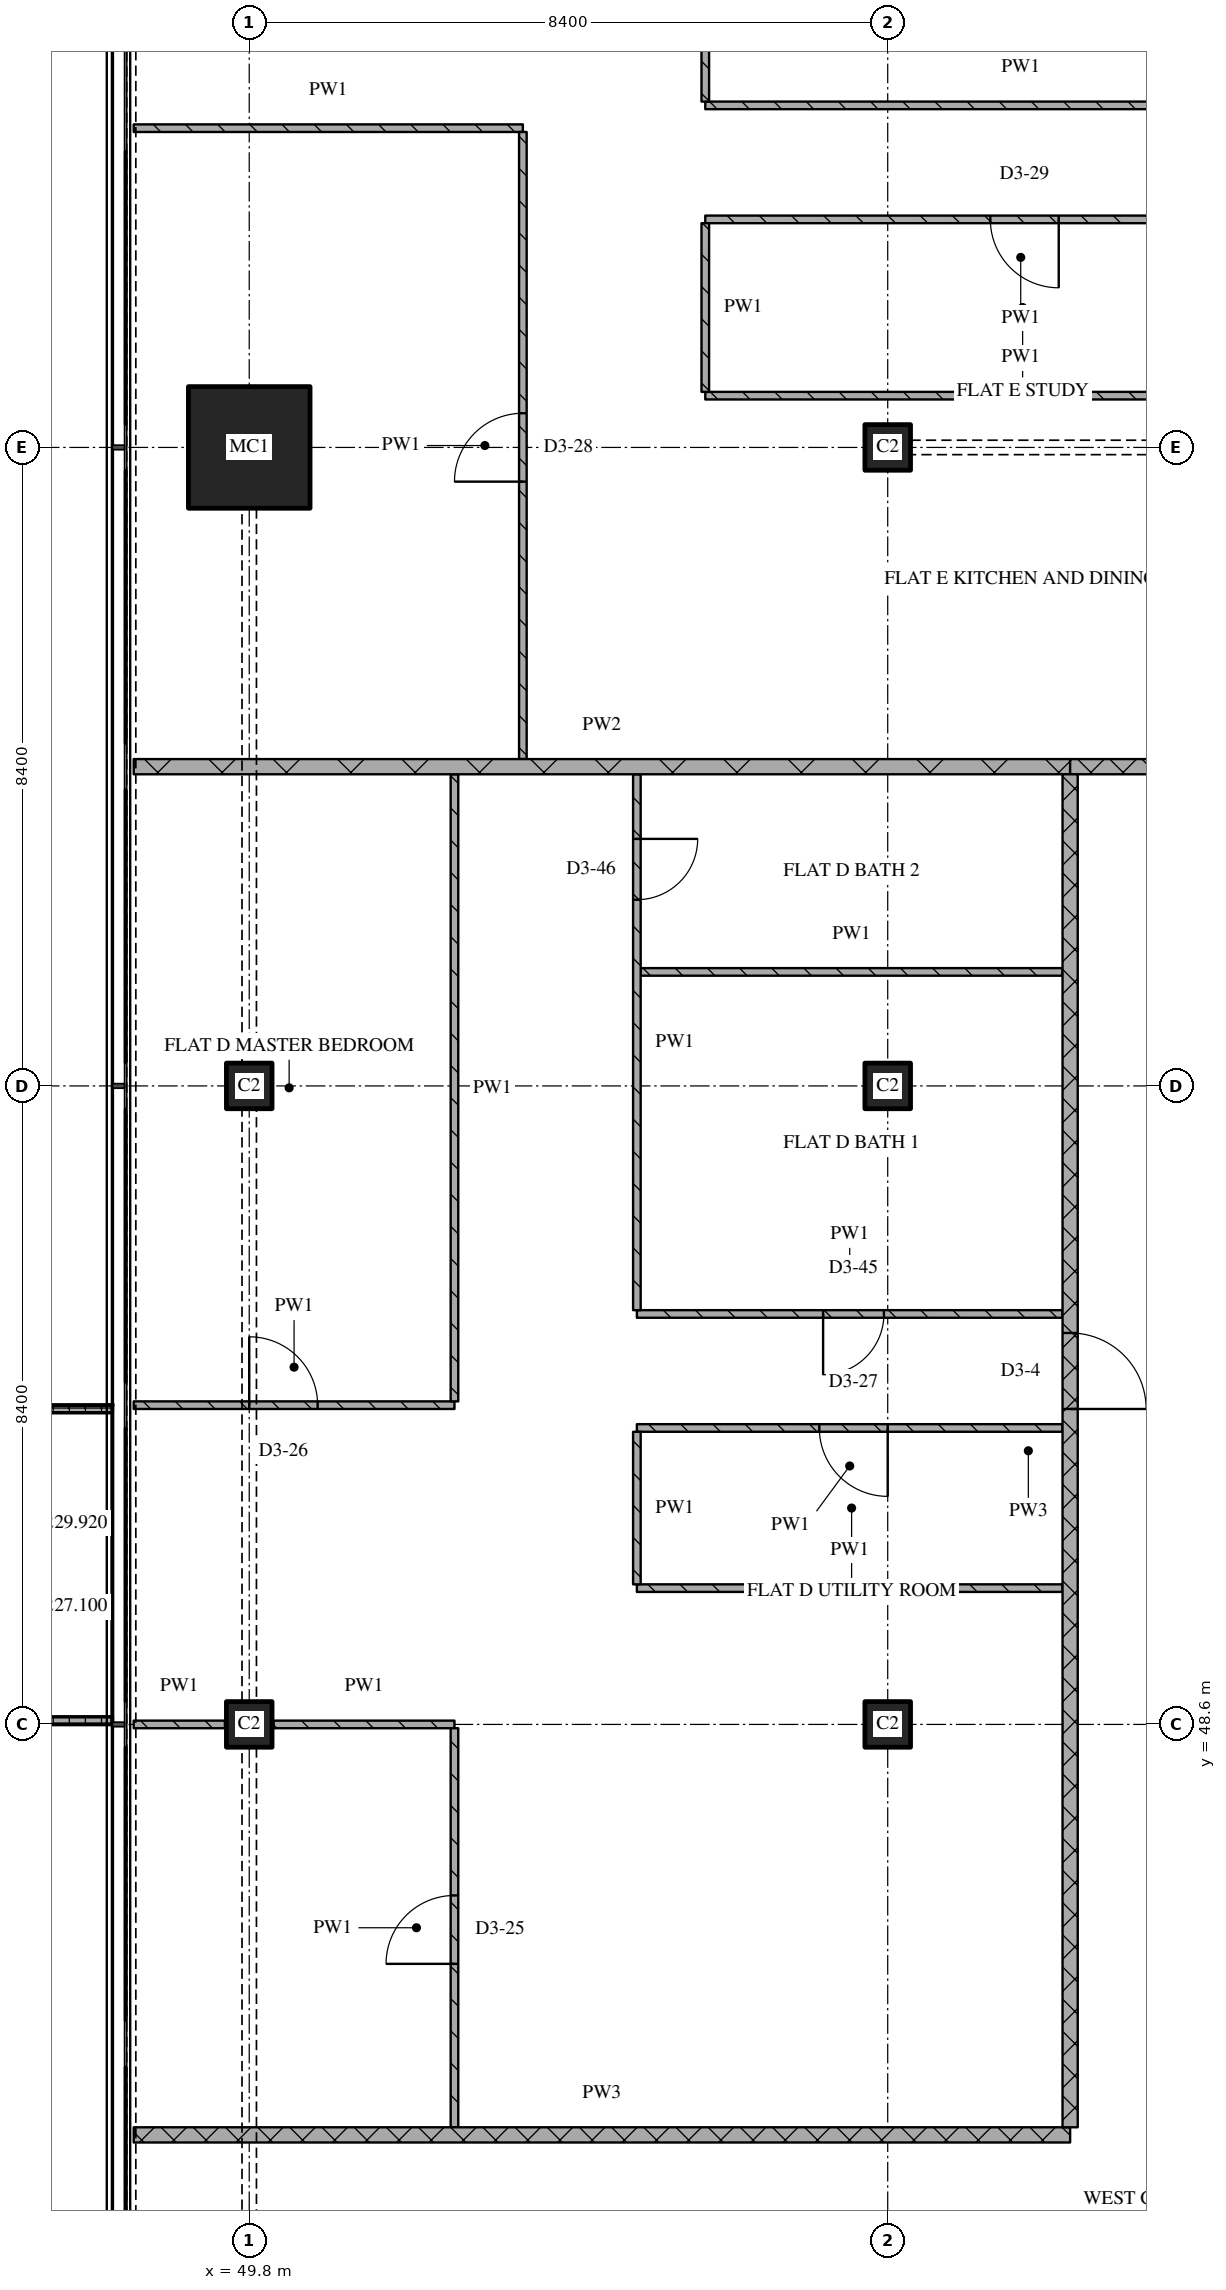
"""IFC4 building model, lengths in metres.
Left out: names, types, materials, properties, quantities, classifications, styles, units other than length and angle.
Written with IfcOpenShell. Run it as: python <this file> out.ifc"""

import sys

from ifc_helpers import new_model, si_unit, direction, frame, frame_2d, origin, origin_2d, place, context, subcontext, project, spatial, polyline, rectangle, outline, extrude, element, fill, save


model = new_model("IFC4")
c1 = context("Model", 3, precision=1e-05, world=origin(), true_north=direction((0.0, 1.0)))
c2 = subcontext(c1, "Body", "Model", "MODEL_VIEW")
j1 = project(units=[si_unit("LENGTHUNIT", "METRE"), si_unit("PLANEANGLEUNIT", "RADIAN")], contexts=[c1])
p1 = place(None, origin())
s1 = spatial("IfcSite", under=j1, at=p1, CompositionType="ELEMENT")
p2 = place(p1, origin())
s2 = spatial("IfcBuilding", under=s1, at=p2, CompositionType="ELEMENT")
p3 = place(p2, frame((0.0, 0.0, 227.1)))
s3 = spatial("IfcBuildingStorey", under=s2, at=p3, CompositionType="ELEMENT", Elevation=227.1)
for number, where, z_axis, x_axis in (
    (1, (49.8, 48.6, 0.0), (0.0, 0.0, 1.0), (1.0, 0.0, 0.0)),
    (2, (49.8, 57.0, 0.0), (0.0, 0.0, 1.0), (1.0, 0.0, 0.0)),
):
    element("IfcColumn", number, at=place(p3, frame(where, z_axis=z_axis, x_axis=x_axis)), inside=s3, PredefinedType="COLUMN", context=c2, shape_type="SweptSolid", body=[
        extrude(rectangle(XDim=0.6, YDim=0.6, at=origin_2d()), origin(), (0.0, 0.0, 1.0), 3.6),
    ])
p4 = place(p3, frame((49.8, 65.4, 0.0), z_axis=(0.0, 0.0, 1.0), x_axis=(1.0, 0.0, 0.0)))
e3 = element("IfcColumn", 3, at=p4, inside=s3, PredefinedType="COLUMN", context=c2, shape_type="SweptSolid", body=[
    extrude(rectangle(XDim=1.6, YDim=1.6, at=origin_2d()), origin(), (0.0, 0.0, 1.0), 3.6),
])
for number, where, z_axis, x_axis in (
    (4, (58.2, 48.6, 0.0), (0.0, 0.0, 1.0), (1.0, 0.0, 0.0)),
    (5, (58.2, 57.0, 0.0), (0.0, 0.0, 1.0), (1.0, 0.0, 0.0)),
    (6, (58.2, 65.4, 0.0), (0.0, 0.0, 1.0), (1.0, 0.0, 0.0)),
):
    element("IfcColumn", number, at=place(p3, frame(where, z_axis=z_axis, x_axis=x_axis)), inside=s3, PredefinedType="COLUMN", context=c2, shape_type="SweptSolid", body=[
        extrude(rectangle(XDim=0.6, YDim=0.6, at=origin_2d()), origin(), (0.0, 0.0, 1.0), 3.6),
    ])
p5 = place(p3, origin())
e7 = element("IfcWall", 7, at=p5, inside=s3, PredefinedType="SOLIDWALL", context=c2, shape_type="SweptSolid", body=[
    extrude(outline(polyline([(48.0, 52.8), (48.0, 52.7), (46.367, 52.7), (46.367, 48.7), (48.0, 48.7), (48.0, 48.6), (46.267, 48.6), (46.267, 52.8), (48.0, 52.8)])), origin(), (0.0, 0.0, 1.0), 1.0),
])
p6 = place(p3, frame((48.28, 43.2, 0.0), z_axis=(0.0, 0.0, 1.0), x_axis=(1.0, 0.0, 0.0)))
e8 = element("IfcWall", 8, at=p6, inside=s3, PredefinedType="PARTITIONING", context=c2, shape_type="SweptSolid", body=[
    extrude(rectangle(XDim=12.32, YDim=0.2, at=frame_2d((6.16, 0.0))), origin(), (0.0, 0.0, 1.0), 3.32),
])
p7 = place(p3, frame((48.28, 48.6, 0.0), z_axis=(0.0, 0.0, 1.0), x_axis=(1.0, 0.0, 0.0)))
e9 = element("IfcWall", 9, at=p7, inside=s3, PredefinedType="PARTITIONING", context=c2, shape_type="SweptSolid", body=[
    extrude(rectangle(XDim=1.2, YDim=0.1, at=frame_2d((0.6, 0.0))), origin(), (0.0, 0.0, 1.0), 3.32),
])
p8 = place(p3, frame((50.12, 48.6, 0.0), z_axis=(0.0, 0.0, 1.0), x_axis=(1.0, 0.0, 0.0)))
e10 = element("IfcWall", 10, at=p8, inside=s3, PredefinedType="PARTITIONING", context=c2, shape_type="SweptSolid", body=[
    extrude(rectangle(XDim=2.38, YDim=0.1, at=frame_2d((1.19, 0.0))), origin(), (0.0, 0.0, 1.0), 3.32),
])
p9 = place(p3, frame((54.9, 50.393, 0.0), z_axis=(0.0, 0.0, 1.0), x_axis=(1.0, 0.0, 0.0)))
e11 = element("IfcWall", 11, at=p9, inside=s3, PredefinedType="PARTITIONING", context=c2, shape_type="SweptSolid", body=[
    extrude(rectangle(XDim=5.6, YDim=0.1, at=frame_2d((2.8, 0.0))), origin(), (0.0, 0.0, 1.0), 3.32),
])
p10 = place(p3, frame((60.5, 52.5, 0.0), z_axis=(0.0, 0.0, 1.0), x_axis=(-1.0, 0.0, 0.0)))
e12 = element("IfcWall", 12, at=p10, inside=s3, PredefinedType="PARTITIONING", context=c2, shape_type="SweptSolid", body=[
    extrude(rectangle(XDim=5.6, YDim=0.1, at=frame_2d((2.8, 0.0))), origin(), (0.0, 0.0, 1.0), 3.32),
])
p11 = place(p10, frame((2.3, 0.0, 0.0)))
e13 = element("IfcOpeningElement", 13, at=p11, cuts=e12, PredefinedType="OPENING", context=c2, shape_type="SweptSolid", body=[
    extrude(rectangle(XDim=0.9, YDim=2.1, at=frame_2d((0.45, 1.05))), frame((0.0, 0.06, 0.0), z_axis=(0.0, -1.0, 0.0), x_axis=(1.0, 0.0, 0.0)), (0.0, 0.0, 1.0), 0.12),
])
p12 = place(p3, frame((48.28, 52.8, 0.0), z_axis=(0.0, 0.0, 1.0), x_axis=(1.0, 0.0, 0.0)))
e14 = element("IfcWall", 14, at=p12, inside=s3, PredefinedType="PARTITIONING", context=c2, shape_type="SweptSolid", body=[
    extrude(rectangle(XDim=4.22, YDim=0.1, at=frame_2d((2.11, 0.0))), origin(), (0.0, 0.0, 1.0), 3.32),
])
p13 = place(p12, frame((1.52, 0.0, 0.0)))
e15 = element("IfcOpeningElement", 15, at=p13, cuts=e14, PredefinedType="OPENING", context=c2, shape_type="SweptSolid", body=[
    extrude(rectangle(XDim=0.9, YDim=2.1, at=frame_2d((0.45, 1.05))), frame((0.0, 0.06, 0.0), z_axis=(0.0, -1.0, 0.0), x_axis=(1.0, 0.0, 0.0)), (0.0, 0.0, 1.0), 0.12),
])
p14 = place(p3, frame((54.9, 54.0, 0.0), z_axis=(0.0, 0.0, 1.0), x_axis=(1.0, 0.0, 0.0)))
e16 = element("IfcWall", 16, at=p14, inside=s3, PredefinedType="PARTITIONING", context=c2, shape_type="SweptSolid", body=[
    extrude(rectangle(XDim=5.6, YDim=0.1, at=frame_2d((2.8, 0.0))), origin(), (0.0, 0.0, 1.0), 3.32),
])
p15 = place(p14, frame((2.45, 0.0, 0.0)))
e17 = element("IfcOpeningElement", 17, at=p15, cuts=e16, PredefinedType="OPENING", context=c2, shape_type="SweptSolid", body=[
    extrude(rectangle(XDim=0.8, YDim=2.1, at=frame_2d((0.4, 1.05))), frame((0.0, 0.06, 0.0), z_axis=(0.0, -1.0, 0.0), x_axis=(1.0, 0.0, 0.0)), (0.0, 0.0, 1.0), 0.12),
])
p16 = place(p3, frame((54.95, 58.5, 0.0), z_axis=(0.0, 0.0, 1.0), x_axis=(1.0, 0.0, 0.0)))
e18 = element("IfcWall", 18, at=p16, inside=s3, PredefinedType="PARTITIONING", context=c2, shape_type="SweptSolid", body=[
    extrude(rectangle(XDim=5.55, YDim=0.1, at=frame_2d((2.775, 0.0))), origin(), (0.0, 0.0, 1.0), 3.32),
])
p17 = place(p3, frame((60.6, 61.2, 0.0), z_axis=(0.0, 0.0, 1.0), x_axis=(1.0, 0.0, 0.0)))
e19 = element("IfcWall", 19, at=p17, inside=s3, PredefinedType="PARTITIONING", context=c2, shape_type="SweptSolid", body=[
    extrude(rectangle(XDim=3.6, YDim=0.2, at=frame_2d((1.8, 0.0))), origin(), (0.0, 0.0, 1.0), 3.32),
])
p18 = place(p3, frame((48.28, 61.2, 0.0), z_axis=(0.0, 0.0, 1.0), x_axis=(1.0, 0.0, 0.0)))
e20 = element("IfcWall", 20, at=p18, inside=s3, PredefinedType="PARTITIONING", context=c2, shape_type="SweptSolid", body=[
    extrude(rectangle(XDim=12.32, YDim=0.2, at=frame_2d((6.16, 0.0))), origin(), (0.0, 0.0, 1.0), 3.32),
])
p19 = place(p3, frame((55.8, 66.081, 0.0), z_axis=(0.0, 0.0, 1.0), x_axis=(1.0, 0.0, 0.0)))
e21 = element("IfcWall", 21, at=p19, inside=s3, PredefinedType="PARTITIONING", context=c2, shape_type="SweptSolid", body=[
    extrude(rectangle(XDim=8.3, YDim=0.1, at=frame_2d((4.15, 0.0))), origin(), (0.0, 0.0, 1.0), 3.32),
])
p20 = place(p3, frame((64.1, 68.4, 0.0), z_axis=(0.0, 0.0, 1.0), x_axis=(-1.0, 0.0, 0.0)))
e22 = element("IfcWall", 22, at=p20, inside=s3, PredefinedType="PARTITIONING", context=c2, shape_type="SweptSolid", body=[
    extrude(rectangle(XDim=8.3, YDim=0.1, at=frame_2d((4.15, 0.0))), origin(), (0.0, 0.0, 1.0), 3.32),
])
p21 = place(p20, frame((3.65, 0.0, 0.0)))
e23 = element("IfcOpeningElement", 23, at=p21, cuts=e22, PredefinedType="OPENING", context=c2, shape_type="SweptSolid", body=[
    extrude(rectangle(XDim=0.9, YDim=2.1, at=frame_2d((0.45, 1.05))), frame((0.0, 0.06, 0.0), z_axis=(0.0, -1.0, 0.0), x_axis=(1.0, 0.0, 0.0)), (0.0, 0.0, 1.0), 0.12),
])
p22 = place(p3, frame((48.28, 69.6, 0.0), z_axis=(0.0, 0.0, 1.0), x_axis=(1.0, 0.0, 0.0)))
e24 = element("IfcWall", 24, at=p22, inside=s3, PredefinedType="PARTITIONING", context=c2, shape_type="SweptSolid", body=[
    extrude(rectangle(XDim=5.12, YDim=0.1, at=frame_2d((2.56, 0.0))), origin(), (0.0, 0.0, 1.0), 3.32),
])
p23 = place(p3, frame((55.8, 69.9, 0.0), z_axis=(0.0, 0.0, 1.0), x_axis=(1.0, 0.0, 0.0)))
e25 = element("IfcWall", 25, at=p23, inside=s3, PredefinedType="PARTITIONING", context=c2, shape_type="SweptSolid", body=[
    extrude(rectangle(XDim=8.3, YDim=0.1, at=frame_2d((4.15, 0.0))), origin(), (0.0, 0.0, 1.0), 3.32),
])
p24 = place(p3, frame((52.5, 43.3, 0.0), z_axis=(0.0, 0.0, 1.0), x_axis=(0.0, 1.0, 0.0)))
e26 = element("IfcWall", 26, at=p24, inside=s3, PredefinedType="PARTITIONING", context=c2, shape_type="SweptSolid", body=[
    extrude(rectangle(XDim=5.25, YDim=0.1, at=frame_2d((2.625, 0.0))), origin(), (0.0, 0.0, 1.0), 3.32),
])
p25 = place(p24, frame((2.15, 0.0, 0.0)))
e27 = element("IfcOpeningElement", 27, at=p25, cuts=e26, PredefinedType="OPENING", context=c2, shape_type="SweptSolid", body=[
    extrude(rectangle(XDim=0.9, YDim=2.1, at=frame_2d((0.45, 1.05))), frame((0.0, 0.06, 0.0), z_axis=(0.0, -1.0, 0.0), x_axis=(1.0, 0.0, 0.0)), (0.0, 0.0, 1.0), 0.12),
])
p26 = place(p3, frame((52.5, 61.1, 0.0), z_axis=(0.0, 0.0, 1.0), x_axis=(0.0, -1.0, 0.0)))
e28 = element("IfcWall", 28, at=p26, inside=s3, PredefinedType="PARTITIONING", context=c2, shape_type="SweptSolid", body=[
    extrude(rectangle(XDim=8.25, YDim=0.1, at=frame_2d((4.125, 0.0))), origin(), (0.0, 0.0, 1.0), 3.32),
])
p27 = place(p3, frame((53.4, 61.3, 0.0), z_axis=(0.0, 0.0, 1.0), x_axis=(0.0, 1.0, 0.0)))
e29 = element("IfcWall", 29, at=p27, inside=s3, PredefinedType="PARTITIONING", context=c2, shape_type="SweptSolid", body=[
    extrude(rectangle(XDim=8.25, YDim=0.1, at=frame_2d((4.125, 0.0))), origin(), (0.0, 0.0, 1.0), 3.32),
])
p28 = place(p27, frame((3.65, 0.0, 0.0)))
e30 = element("IfcOpeningElement", 30, at=p28, cuts=e29, PredefinedType="OPENING", context=c2, shape_type="SweptSolid", body=[
    extrude(rectangle(XDim=0.9, YDim=2.1, at=frame_2d((0.45, 1.05))), frame((0.0, 0.06, 0.0), z_axis=(0.0, -1.0, 0.0), x_axis=(1.0, 0.0, 0.0)), (0.0, 0.0, 1.0), 0.12),
])
p29 = place(p3, frame((54.9, 52.45, 0.0), z_axis=(0.0, 0.0, 1.0), x_axis=(0.0, -1.0, 0.0)))
e31 = element("IfcWall", 31, at=p29, inside=s3, PredefinedType="PARTITIONING", context=c2, shape_type="SweptSolid", body=[
    extrude(rectangle(XDim=2.007, YDim=0.1, at=frame_2d((1.003, 0.0))), origin(), (0.0, 0.0, 1.0), 3.32),
])
p30 = place(p3, frame((54.9, 61.1, 0.0), z_axis=(0.0, 0.0, 1.0), x_axis=(0.0, -1.0, 0.0)))
e32 = element("IfcWall", 32, at=p30, inside=s3, PredefinedType="PARTITIONING", context=c2, shape_type="SweptSolid", body=[
    extrude(rectangle(XDim=7.05, YDim=0.1, at=frame_2d((3.525, 0.0))), origin(), (0.0, 0.0, 1.0), 3.32),
])
p31 = place(p30, frame((0.85, 0.0, 0.0)))
e33 = element("IfcOpeningElement", 33, at=p31, cuts=e32, PredefinedType="OPENING", context=c2, shape_type="SweptSolid", body=[
    extrude(rectangle(XDim=0.8, YDim=2.1, at=frame_2d((0.4, 1.05))), frame((0.0, 0.06, 0.0), z_axis=(0.0, -1.0, 0.0), x_axis=(1.0, 0.0, 0.0)), (0.0, 0.0, 1.0), 0.12),
])
p32 = place(p3, frame((55.8, 68.35, 0.0), z_axis=(0.0, 0.0, 1.0), x_axis=(0.0, -1.0, 0.0)))
e34 = element("IfcWall", 34, at=p32, inside=s3, PredefinedType="PARTITIONING", context=c2, shape_type="SweptSolid", body=[
    extrude(rectangle(XDim=2.219, YDim=0.1, at=frame_2d((1.109, 0.0))), origin(), (0.0, 0.0, 1.0), 3.32),
])
p33 = place(p3, frame((55.8, 75.32, 0.0), z_axis=(0.0, 0.0, 1.0), x_axis=(0.0, -1.0, 0.0)))
e35 = element("IfcWall", 35, at=p33, inside=s3, PredefinedType="PARTITIONING", context=c2, shape_type="SweptSolid", body=[
    extrude(rectangle(XDim=5.37, YDim=0.1, at=frame_2d((2.685, 0.0))), origin(), (0.0, 0.0, 1.0), 3.32),
])
p34 = place(p33, frame((0.542, 0.0, 0.0)))
e36 = element("IfcOpeningElement", 36, at=p34, cuts=e35, PredefinedType="OPENING", context=c2, shape_type="SweptSolid", body=[
    extrude(rectangle(XDim=0.9, YDim=2.1, at=frame_2d((0.45, 1.05))), frame((0.0, 0.06, 0.0), z_axis=(0.0, -1.0, 0.0), x_axis=(1.0, 0.0, 0.0)), (0.0, 0.0, 1.0), 0.12),
])
p35 = place(p33, frame((3.443, 0.0, 0.0)))
e37 = element("IfcOpeningElement", 37, at=p35, cuts=e35, PredefinedType="OPENING", context=c2, shape_type="SweptSolid", body=[
    extrude(rectangle(XDim=0.8, YDim=2.1, at=frame_2d((0.4, 1.05))), frame((0.0, 0.06, 0.0), z_axis=(0.0, -1.0, 0.0), x_axis=(1.0, 0.0, 0.0)), (0.0, 0.0, 1.0), 0.12),
])
p36 = place(p3, frame((60.6, 43.3, 0.0), z_axis=(0.0, 0.0, 1.0), x_axis=(0.0, 1.0, 0.0)))
e38 = element("IfcWall", 38, at=p36, inside=s3, PredefinedType="PARTITIONING", context=c2, shape_type="SweptSolid", body=[
    extrude(rectangle(XDim=17.8, YDim=0.2, at=frame_2d((8.9, 0.0))), origin(), (0.0, 0.0, 1.0), 3.32),
])
p37 = place(p36, frame((9.45, 0.0, 0.0)))
e39 = element("IfcOpeningElement", 39, at=p37, cuts=e38, PredefinedType="OPENING", context=c2, shape_type="SweptSolid", body=[
    extrude(rectangle(XDim=1.0, YDim=2.1, at=frame_2d((0.5, 1.05))), frame((0.0, 0.11, 0.0), z_axis=(0.0, -1.0, 0.0), x_axis=(1.0, 0.0, 0.0)), (0.0, 0.0, 1.0), 0.22),
])
p38 = place(p11, origin())
e40 = element("IfcDoor", 40, at=p38, inside=s3, OperationType="SINGLE_SWING_LEFT", PredefinedType="DOOR", context=c2, shape_type="SweptSolid", body=[
    extrude(rectangle(XDim=0.9, YDim=2.1, at=frame_2d((0.45, 1.05))), frame((0.0, 0.025, 0.0), z_axis=(0.0, -1.0, 0.0), x_axis=(1.0, 0.0, 0.0)), (0.0, 0.0, 1.0), 0.05),
])
fill(e13, e40)
p39 = place(p13, origin())
e41 = element("IfcDoor", 41, at=p39, inside=s3, OperationType="SINGLE_SWING_LEFT", PredefinedType="DOOR", context=c2, shape_type="SweptSolid", body=[
    extrude(rectangle(XDim=0.9, YDim=2.1, at=frame_2d((0.45, 1.05))), frame((0.0, 0.025, 0.0), z_axis=(0.0, -1.0, 0.0), x_axis=(1.0, 0.0, 0.0)), (0.0, 0.0, 1.0), 0.05),
])
fill(e15, e41)
p40 = place(p15, origin())
e42 = element("IfcDoor", 42, at=p40, inside=s3, OperationType="SINGLE_SWING_RIGHT", PredefinedType="DOOR", context=c2, shape_type="SweptSolid", body=[
    extrude(rectangle(XDim=0.8, YDim=2.1, at=frame_2d((0.4, 1.05))), frame((0.0, 0.025, 0.0), z_axis=(0.0, -1.0, 0.0), x_axis=(1.0, 0.0, 0.0)), (0.0, 0.0, 1.0), 0.05),
])
fill(e17, e42)
p41 = place(p21, origin())
e43 = element("IfcDoor", 43, at=p41, inside=s3, OperationType="SINGLE_SWING_LEFT", PredefinedType="DOOR", context=c2, shape_type="SweptSolid", body=[
    extrude(rectangle(XDim=0.9, YDim=2.1, at=frame_2d((0.45, 1.05))), frame((0.0, 0.025, 0.0), z_axis=(0.0, -1.0, 0.0), x_axis=(1.0, 0.0, 0.0)), (0.0, 0.0, 1.0), 0.05),
])
fill(e23, e43)
p42 = place(p25, origin())
e44 = element("IfcDoor", 44, at=p42, inside=s3, OperationType="SINGLE_SWING_LEFT", PredefinedType="DOOR", context=c2, shape_type="SweptSolid", body=[
    extrude(rectangle(XDim=0.9, YDim=2.1, at=frame_2d((0.45, 1.05))), frame((0.0, 0.025, 0.0), z_axis=(0.0, -1.0, 0.0), x_axis=(1.0, 0.0, 0.0)), (0.0, 0.0, 1.0), 0.05),
])
fill(e27, e44)
p43 = place(p28, origin())
e45 = element("IfcDoor", 45, at=p43, inside=s3, OperationType="SINGLE_SWING_LEFT", PredefinedType="DOOR", context=c2, shape_type="SweptSolid", body=[
    extrude(rectangle(XDim=0.9, YDim=2.1, at=frame_2d((0.45, 1.05))), frame((0.0, 0.025, 0.0), z_axis=(0.0, -1.0, 0.0), x_axis=(1.0, 0.0, 0.0)), (0.0, 0.0, 1.0), 0.05),
])
fill(e30, e45)
p44 = place(p31, origin())
e46 = element("IfcDoor", 46, at=p44, inside=s3, OperationType="SINGLE_SWING_LEFT", PredefinedType="DOOR", context=c2, shape_type="SweptSolid", body=[
    extrude(rectangle(XDim=0.8, YDim=2.1, at=frame_2d((0.4, 1.05))), frame((0.0, 0.025, 0.0), z_axis=(0.0, -1.0, 0.0), x_axis=(1.0, 0.0, 0.0)), (0.0, 0.0, 1.0), 0.05),
])
fill(e33, e46)
p45 = place(p37, origin())
e47 = element("IfcDoor", 47, at=p45, inside=s3, OperationType="SINGLE_SWING_RIGHT", PredefinedType="DOOR", context=c2, shape_type="SweptSolid", body=[
    extrude(rectangle(XDim=1.0, YDim=2.1, at=frame_2d((0.5, 1.05))), frame((0.0, 0.025, 0.0), z_axis=(0.0, -1.0, 0.0), x_axis=(1.0, 0.0, 0.0)), (0.0, 0.0, 1.0), 0.05),
])
fill(e39, e47)
save(model, sys.argv[1])
